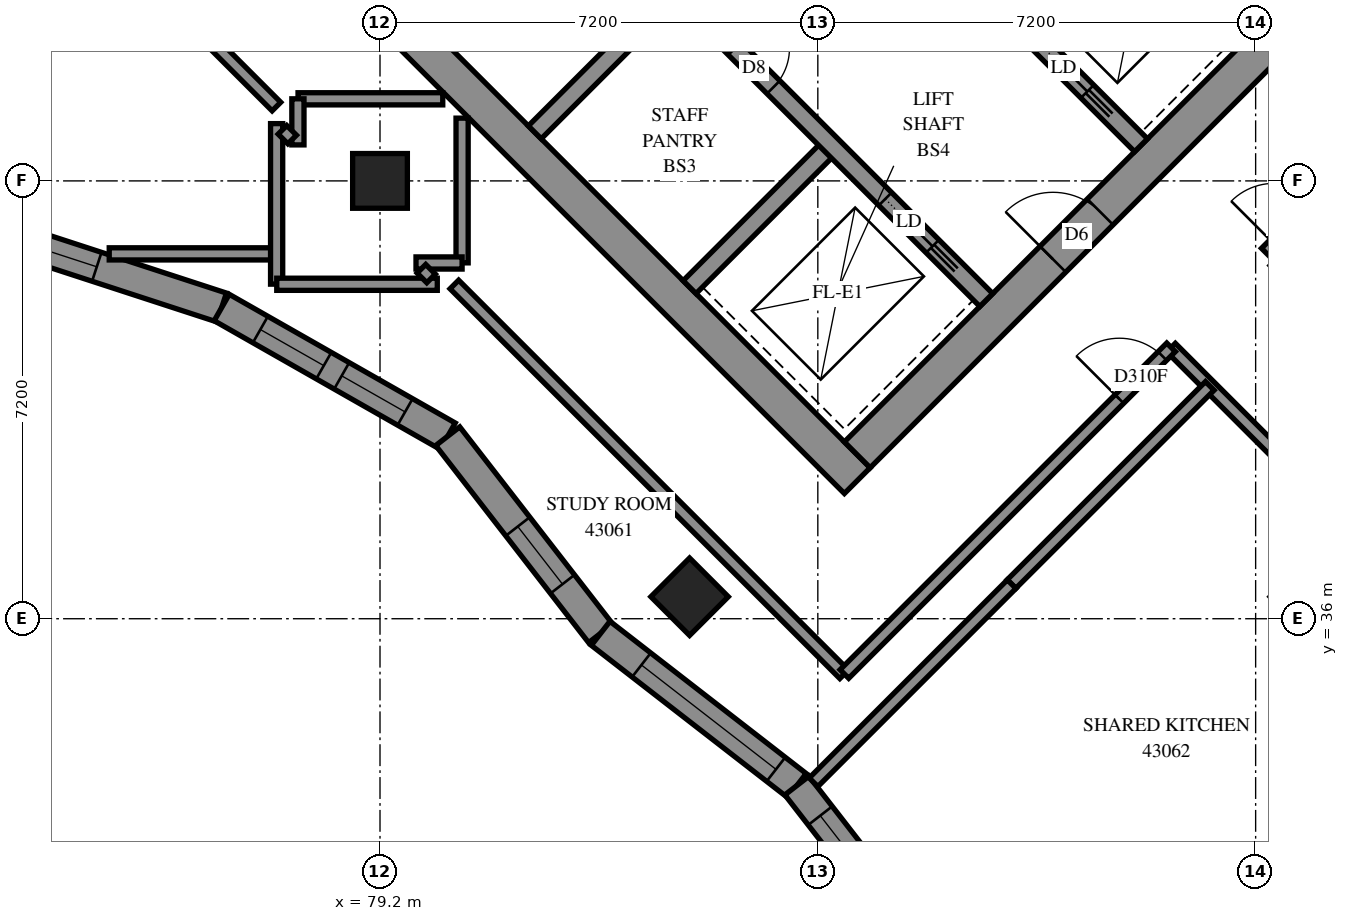
"""IFC4 building model, lengths in metres.
Left out: names, types, materials, properties, quantities, classifications, styles, units other than length and angle.
Written with IfcOpenShell. Run it as: python <this file> out.ifc"""

import sys

from ifc_helpers import new_model, si_unit, direction, frame, frame_2d, origin, origin_2d, place, context, subcontext, project, spatial, polyline, rectangle, outline, extrude, element, fill, save


model = new_model("IFC4")
c1 = context("Model", 3, precision=1e-05, world=origin(), true_north=direction((0.0, 1.0)))
c2 = subcontext(c1, "Body", "Model", "MODEL_VIEW")
j1 = project(units=[si_unit("LENGTHUNIT", "METRE"), si_unit("PLANEANGLEUNIT", "RADIAN")], contexts=[c1])
p1 = place(None, origin())
s1 = spatial("IfcSite", under=j1, at=p1, CompositionType="ELEMENT")
p2 = place(p1, origin())
s2 = spatial("IfcBuilding", under=s1, at=p2, CompositionType="ELEMENT")
p3 = place(p2, frame((0.0, 0.0, 159.2)))
s3 = spatial("IfcBuildingStorey", under=s2, at=p3, CompositionType="ELEMENT", Elevation=159.2)
for number, where, z_axis, x_axis in (
    (1, (79.2, 43.2, 0.0), (0.0, 0.0, 1.0), (1.0, 0.0, 0.0)),
    (2, (84.291, 36.362, 0.0), (0.0, 0.0, 1.0), (0.707, -0.707, 0.0)),
):
    element("IfcColumn", number, at=place(p3, frame(where, z_axis=z_axis, x_axis=x_axis)), inside=s3, PredefinedType="COLUMN", context=c2, shape_type="SweptSolid", body=[
        extrude(rectangle(XDim=0.9, YDim=0.9, at=origin_2d()), origin(), (0.0, 0.0, 1.0), 3.1),
    ])
p4 = place(p3, frame((76.018, 49.302, -0.3), z_axis=(0.0, 0.0, 1.0), x_axis=(0.7071067812, -0.7071067812, 0.0)))
e3 = element("IfcWall", 3, at=p4, inside=s3, PredefinedType="SHEAR", context=c2, shape_type="SweptSolid", body=[
    extrude(rectangle(XDim=15.6, YDim=0.6, at=frame_2d((7.8, 0.0))), origin(), (0.0, 0.0, 1.0), 2.7),
])
p5 = place(p3, frame((87.049, 38.695, -0.3), z_axis=(0.0, 0.0, 1.0), x_axis=(0.7071067812, 0.7071067812, 0.0)))
e4 = element("IfcWall", 4, at=p5, inside=s3, PredefinedType="SHEAR", context=c2, shape_type="SweptSolid", body=[
    extrude(rectangle(XDim=14.4, YDim=0.6, at=frame_2d((7.2, 0.0))), origin(), (0.0, 0.0, 1.0), 2.7),
])
p6 = place(p5, frame((4.55, 0.0, 0.3)))
e5 = element("IfcOpeningElement", 5, at=p6, cuts=e4, PredefinedType="OPENING", context=c2, shape_type="SweptSolid", body=[
    extrude(rectangle(XDim=1.1, YDim=2.1, at=frame_2d((0.55, 1.05))), frame((0.0, 0.31, 0.0), z_axis=(0.0, -1.0, 0.0), x_axis=(1.0, 0.0, 0.0)), (0.0, 0.0, 1.0), 0.62),
])
p7 = place(p5, frame((11.35, 0.0, 0.3)))
e6 = element("IfcOpeningElement", 6, at=p7, cuts=e4, PredefinedType="OPENING", context=c2, shape_type="SweptSolid", body=[
    extrude(rectangle(XDim=1.1, YDim=2.1, at=frame_2d((0.55, 1.05))), frame((0.0, 0.31, 0.0), z_axis=(0.0, -1.0, 0.0), x_axis=(1.0, 0.0, 0.0)), (0.0, 0.0, 1.0), 0.62),
])
for number, where, z_axis, x_axis in (
    (7, (81.746, 43.999, 0.0), (0.0, 0.0, 1.0), (0.707, 0.707, 0.0)),
    (8, (84.291, 41.453, 0.0), (0.0, 0.0, 1.0), (0.707, 0.707, 0.0)),
):
    element("IfcWall", number, at=place(p3, frame(where, z_axis=z_axis, x_axis=x_axis)), inside=s3, PredefinedType="SOLIDWALL", context=c2, shape_type="SweptSolid", body=[
        extrude(rectangle(XDim=3.3, YDim=0.3, at=frame_2d((1.65, 0.0))), origin(), (0.0, 0.0, 1.0), 3.1),
    ])
p8 = place(p3, frame((78.988, 51.423, 0.0), z_axis=(0.0, 0.0, 1.0), x_axis=(0.7071067812, -0.7071067812, 0.0)))
e9 = element("IfcWall", 9, at=p8, inside=s3, PredefinedType="SOLIDWALL", context=c2, shape_type="SweptSolid", body=[
    extrude(rectangle(XDim=14.4, YDim=0.3, at=frame_2d((7.2, 0.0))), origin(), (0.0, 0.0, 1.0), 3.1),
])
p9 = place(p8, frame((1.35, 0.0, 0.0)))
e10 = element("IfcOpeningElement", 10, at=p9, cuts=e9, PredefinedType="OPENING", context=c2, shape_type="SweptSolid", body=[
    extrude(rectangle(XDim=0.9, YDim=2.1, at=frame_2d((0.45, 1.05))), frame((0.0, 0.16, 0.0), z_axis=(0.0, -1.0, 0.0), x_axis=(1.0, 0.0, 0.0)), (0.0, 0.0, 1.0), 0.32),
])
p10 = place(p8, frame((4.95, 0.0, 0.0)))
e11 = element("IfcOpeningElement", 11, at=p10, cuts=e9, PredefinedType="OPENING", context=c2, shape_type="SweptSolid", body=[
    extrude(rectangle(XDim=0.9, YDim=2.1, at=frame_2d((0.45, 1.05))), frame((0.0, 0.16, 0.0), z_axis=(0.0, -1.0, 0.0), x_axis=(1.0, 0.0, 0.0)), (0.0, 0.0, 1.0), 0.32),
])
p11 = place(p8, frame((8.55, 0.0, 0.0)))
e12 = element("IfcOpeningElement", 12, at=p11, cuts=e9, PredefinedType="OPENING", context=c2, shape_type="SweptSolid", body=[
    extrude(rectangle(XDim=0.9, YDim=2.1, at=frame_2d((0.45, 1.05))), frame((0.0, 0.16, 0.0), z_axis=(0.0, -1.0, 0.0), x_axis=(1.0, 0.0, 0.0)), (0.0, 0.0, 1.0), 0.32),
])
p12 = place(p8, frame((12.05, 0.0, 0.0)))
e13 = element("IfcOpeningElement", 13, at=p12, cuts=e9, PredefinedType="OPENING", context=c2, shape_type="SweptSolid", body=[
    extrude(rectangle(XDim=1.1, YDim=2.1, at=frame_2d((0.55, 1.05))), frame((0.0, 0.16, 0.0), z_axis=(0.0, -1.0, 0.0), x_axis=(1.0, 0.0, 0.0)), (0.0, 0.0, 1.0), 0.32),
])
p13 = place(p3, frame((81.534, 53.969, 0.0), z_axis=(0.0, 0.0, 1.0), x_axis=(0.707103309, -0.7071102534, 0.0)))
e14 = element("IfcWall", 14, at=p13, inside=s3, PredefinedType="SOLIDWALL", context=c2, shape_type="SweptSolid", body=[
    extrude(rectangle(XDim=14.4, YDim=0.3, at=frame_2d((7.2, 0.0))), origin(), (0.0, 0.0, 1.0), 3.1),
])
p14 = place(p13, frame((1.25, 0.0, 0.0)))
e15 = element("IfcOpeningElement", 15, at=p14, cuts=e14, PredefinedType="OPENING", context=c2, shape_type="SweptSolid", body=[
    extrude(rectangle(XDim=1.1, YDim=2.1, at=frame_2d((0.55, 1.05))), frame((0.0, 0.16, 0.0), z_axis=(0.0, -1.0, 0.0), x_axis=(1.0, 0.0, 0.0)), (0.0, 0.0, 1.0), 0.32),
])
p15 = place(p13, frame((4.85, 0.0, 0.0)))
e16 = element("IfcOpeningElement", 16, at=p15, cuts=e14, PredefinedType="OPENING", context=c2, shape_type="SweptSolid", body=[
    extrude(rectangle(XDim=1.1, YDim=2.1, at=frame_2d((0.55, 1.05))), frame((0.0, 0.16, 0.0), z_axis=(0.0, -1.0, 0.0), x_axis=(1.0, 0.0, 0.0)), (0.0, 0.0, 1.0), 0.32),
])
p16 = place(p13, frame((8.45, 0.0, 0.0)))
e17 = element("IfcOpeningElement", 17, at=p16, cuts=e14, PredefinedType="OPENING", context=c2, shape_type="SweptSolid", body=[
    extrude(rectangle(XDim=1.1, YDim=2.1, at=frame_2d((0.55, 1.05))), frame((0.0, 0.16, 0.0), z_axis=(0.0, -1.0, 0.0), x_axis=(1.0, 0.0, 0.0)), (0.0, 0.0, 1.0), 0.32),
])
p17 = place(p13, frame((12.05, 0.0, 0.0)))
e18 = element("IfcOpeningElement", 18, at=p17, cuts=e14, PredefinedType="OPENING", context=c2, shape_type="SweptSolid", body=[
    extrude(rectangle(XDim=1.1, YDim=2.1, at=frame_2d((0.55, 1.05))), frame((0.0, 0.16, 0.0), z_axis=(0.0, -1.0, 0.0), x_axis=(1.0, 0.0, 0.0)), (0.0, 0.0, 1.0), 0.32),
])
p18 = place(p3, frame((73.105, 42.256, 0.0), z_axis=(0.0, 0.0, 1.0), x_axis=(0.9507748373, -0.3098825725, 0.0)))
e19 = element("IfcWall", 19, at=p18, inside=s3, PredefinedType="SOLIDWALL", context=c2, shape_type="SweptSolid", body=[
    extrude(outline(polyline([(0.059, -0.25), (3.648, -0.25), (3.698, 0.25), (-0.059, 0.25), (0.059, -0.25)])), origin(), (0.0, 0.0, 1.0), 3.1),
])
p19 = place(p18, frame((0.312, 0.0, 0.45)))
e20 = element("IfcOpeningElement", 20, at=p19, cuts=e19, PredefinedType="OPENING", context=c2, shape_type="SweptSolid", body=[
    extrude(rectangle(XDim=1.2, YDim=2.5, at=frame_2d((0.6, 1.25))), frame((0.0, 0.26, 0.0), z_axis=(0.0, -1.0, 0.0), x_axis=(1.0, 0.0, 0.0)), (0.0, 0.0, 1.0), 0.52),
])
p20 = place(p3, frame((76.597, 41.118, 0.0), z_axis=(0.0, 0.0, 1.0), x_axis=(0.8690276155, -0.4947635835, 0.0)))
e21 = element("IfcWall", 21, at=p20, inside=s3, PredefinedType="SOLIDWALL", context=c2, shape_type="SweptSolid", body=[
    extrude(outline(polyline([(0.025, -0.25), (4.227, -0.25), (4.327, 0.25), (-0.025, 0.25), (0.025, -0.25)])), origin(), (0.0, 0.0, 1.0), 3.1),
])
p21 = place(p20, frame((0.732, 0.0, 0.45)))
e22 = element("IfcOpeningElement", 22, at=p21, cuts=e21, PredefinedType="OPENING", context=c2, shape_type="SweptSolid", body=[
    extrude(rectangle(XDim=1.2, YDim=2.5, at=frame_2d((0.6, 1.25))), frame((0.0, 0.26, 0.0), z_axis=(0.0, -1.0, 0.0), x_axis=(1.0, 0.0, 0.0)), (0.0, 0.0, 1.0), 0.52),
])
p22 = place(p20, frame((2.27, 0.0, 0.45)))
e23 = element("IfcOpeningElement", 23, at=p22, cuts=e21, PredefinedType="OPENING", context=c2, shape_type="SweptSolid", body=[
    extrude(rectangle(XDim=1.2, YDim=2.5, at=frame_2d((0.6, 1.25))), frame((0.0, 0.26, 0.0), z_axis=(0.0, -1.0, 0.0), x_axis=(1.0, 0.0, 0.0)), (0.0, 0.0, 1.0), 0.52),
])
p23 = place(p3, frame((80.314, 39.002, 0.0), z_axis=(0.0, 0.0, 1.0), x_axis=(0.6128921644, -0.7901665614, 0.0)))
e24 = element("IfcWall", 24, at=p23, inside=s3, PredefinedType="SOLIDWALL", context=c2, shape_type="SweptSolid", body=[
    extrude(outline(polyline([(0.05, -0.25), (4.134, -0.25), (4.071, 0.25), (-0.05, 0.25), (0.05, -0.25)])), origin(), (0.0, 0.0, 1.0), 3.1),
])
p24 = place(p23, frame((1.879, 0.0, 0.45)))
e25 = element("IfcOpeningElement", 25, at=p24, cuts=e24, PredefinedType="OPENING", context=c2, shape_type="SweptSolid", body=[
    extrude(rectangle(XDim=1.2, YDim=2.5, at=frame_2d((0.6, 1.25))), frame((0.0, 0.26, 0.0), z_axis=(0.0, -1.0, 0.0), x_axis=(1.0, 0.0, 0.0)), (0.0, 0.0, 1.0), 0.52),
])
p25 = place(p3, frame((82.828, 35.76, 0.0), z_axis=(0.0, 0.0, 1.0), x_axis=(0.7901609986, -0.6128993362, 0.0)))
e26 = element("IfcWall", 26, at=p25, inside=s3, PredefinedType="SOLIDWALL", context=c2, shape_type="SweptSolid", body=[
    extrude(outline(polyline([(-0.032, -0.25), (4.053, -0.25), (4.116, 0.25), (0.032, 0.25), (-0.032, -0.25)])), origin(), (0.0, 0.0, 1.0), 3.1),
])
p26 = place(p25, frame((0.849, 0.0, 0.45)))
e27 = element("IfcOpeningElement", 27, at=p26, cuts=e26, PredefinedType="OPENING", context=c2, shape_type="SweptSolid", body=[
    extrude(rectangle(XDim=2.8, YDim=2.5, at=frame_2d((1.4, 1.25))), frame((0.0, 0.26, 0.0), z_axis=(0.0, -1.0, 0.0), x_axis=(1.0, 0.0, 0.0)), (0.0, 0.0, 1.0), 0.52),
])
p27 = place(p3, frame((86.056, 33.257, 0.0), z_axis=(0.0, 0.0, 1.0), x_axis=(0.6128993362, -0.7901609986, 0.0)))
e28 = element("IfcWall", 28, at=p27, inside=s3, PredefinedType="SOLIDWALL", context=c2, shape_type="SweptSolid", body=[
    extrude(outline(polyline([(0.032, -0.25), (4.116, -0.25), (4.053, 0.25), (-0.032, 0.25), (0.032, -0.25)])), origin(), (0.0, 0.0, 1.0), 3.1),
])
p28 = place(p27, frame((0.626, 0.0, 0.45)))
e29 = element("IfcOpeningElement", 29, at=p28, cuts=e28, PredefinedType="OPENING", context=c2, shape_type="SweptSolid", body=[
    extrude(rectangle(XDim=2.8, YDim=2.5, at=frame_2d((1.4, 1.25))), frame((0.0, 0.26, 0.0), z_axis=(0.0, -1.0, 0.0), x_axis=(1.0, 0.0, 0.0)), (0.0, 0.0, 1.0), 0.52),
])
p29 = place(p3, frame((92.209, 40.459, 0.0), z_axis=(0.0, 0.0, 1.0), x_axis=(0.7071067812, -0.7071067812, 0.0)))
e30 = element("IfcWall", 30, at=p29, inside=s3, PredefinedType="PARTITIONING", context=c2, shape_type="SweptSolid", body=[
    extrude(rectangle(XDim=11.698, YDim=0.2, at=frame_2d((5.849, 0.0))), origin(), (0.0, 0.0, 1.0), 3.1),
])
p30 = place(p29, frame((2.931, 0.0, 0.0)))
e31 = element("IfcOpeningElement", 31, at=p30, cuts=e30, PredefinedType="OPENING", context=c2, shape_type="SweptSolid", body=[
    extrude(rectangle(XDim=1.0, YDim=2.1, at=frame_2d((0.5, 1.05))), frame((0.0, 0.11, 0.0), z_axis=(0.0, -1.0, 0.0), x_axis=(1.0, 0.0, 0.0)), (0.0, 0.0, 1.0), 0.22),
])
p31 = place(p29, frame((10.223, 0.0, 0.0)))
e32 = element("IfcOpeningElement", 32, at=p31, cuts=e30, PredefinedType="OPENING", context=c2, shape_type="SweptSolid", body=[
    extrude(rectangle(XDim=0.9, YDim=2.1, at=frame_2d((0.45, 1.05))), frame((0.0, 0.11, 0.0), z_axis=(0.0, -1.0, 0.0), x_axis=(1.0, 0.0, 0.0)), (0.0, 0.0, 1.0), 0.22),
])
p32 = place(p3, frame((93.767, 42.021, 0.0), z_axis=(0.0, 0.0, 1.0), x_axis=(0.7071067812, 0.7071067812, 0.0)))
e33 = element("IfcWall", 33, at=p32, inside=s3, PredefinedType="PARTITIONING", context=c2, shape_type="SweptSolid", body=[
    extrude(rectangle(XDim=9.998, YDim=0.2, at=frame_2d((4.999, 0.0))), origin(), (0.0, 0.0, 1.0), 3.1),
])
p33 = place(p32, frame((0.196, 0.0, 0.0)))
e34 = element("IfcOpeningElement", 34, at=p33, cuts=e33, PredefinedType="OPENING", context=c2, shape_type="SweptSolid", body=[
    extrude(rectangle(XDim=1.0, YDim=2.1, at=frame_2d((0.5, 1.05))), frame((0.0, 0.11, 0.0), z_axis=(0.0, -1.0, 0.0), x_axis=(1.0, 0.0, 0.0)), (0.0, 0.0, 1.0), 0.22),
])
p34 = place(p3, frame((80.423, 41.497, 0.0), z_axis=(0.0, 0.0, 1.0), x_axis=(0.7071067812, -0.7071067812, 0.0)))
e35 = element("IfcWall", 35, at=p34, inside=s3, PredefinedType="PARTITIONING", context=c2, shape_type="SweptSolid", body=[
    extrude(rectangle(XDim=9.065, YDim=0.2, at=frame_2d((4.532, 0.0))), origin(), (0.0, 0.0, 1.0), 3.1),
])
p35 = place(p3, frame((86.837, 35.091, 0.0), z_axis=(0.0, 0.0, 1.0), x_axis=(0.7071067812, 0.7071067812, 0.0)))
e36 = element("IfcWall", 36, at=p35, inside=s3, PredefinedType="PARTITIONING", context=c2, shape_type="SweptSolid", body=[
    extrude(rectangle(XDim=7.597, YDim=0.2, at=frame_2d((3.799, 0.0))), origin(), (0.0, 0.0, 1.0), 3.1),
])
p36 = place(p35, frame((6.395, 0.0, 0.0)))
e37 = element("IfcOpeningElement", 37, at=p36, cuts=e36, PredefinedType="OPENING", context=c2, shape_type="SweptSolid", body=[
    extrude(rectangle(XDim=1.0, YDim=2.1, at=frame_2d((0.5, 1.05))), frame((0.0, 0.11, 0.0), z_axis=(0.0, -1.0, 0.0), x_axis=(1.0, 0.0, 0.0)), (0.0, 0.0, 1.0), 0.22),
])
p37 = place(p3, frame((91.366, 28.168, 0.0), z_axis=(0.0, 0.0, 1.0), x_axis=(0.7072591319, 0.7069543977, 0.0)))
e38 = element("IfcWall", 38, at=p37, inside=s3, PredefinedType="PARTITIONING", context=c2, shape_type="SweptSolid", body=[
    extrude(rectangle(XDim=6.891, YDim=0.2, at=frame_2d((3.446, 0.0))), origin(), (0.0, 0.0, 1.0), 3.1),
])
p38 = place(p3, frame((74.223, 47.697, 0.0), z_axis=(0.0, 0.0, 1.0), x_axis=(0.7071067812, -0.7071067812, 0.0)))
e39 = element("IfcWall", 39, at=p38, inside=s3, PredefinedType="PARTITIONING", context=c2, shape_type="SweptSolid", body=[
    extrude(rectangle(XDim=4.63, YDim=0.2, at=frame_2d((2.315, 0.0))), origin(), (0.0, 0.0, 1.0), 3.1),
])
p39 = place(p38, frame((0.401, 0.0, 0.0)))
e40 = element("IfcOpeningElement", 40, at=p39, cuts=e39, PredefinedType="OPENING", context=c2, shape_type="SweptSolid", body=[
    extrude(rectangle(XDim=1.0, YDim=2.1, at=frame_2d((0.5, 1.05))), frame((0.0, 0.11, 0.0), z_axis=(0.0, -1.0, 0.0), x_axis=(1.0, 0.0, 0.0)), (0.0, 0.0, 1.0), 0.22),
])
p40 = place(p3, frame((89.586, 36.57, 0.0), z_axis=(0.0, 0.0, 1.0), x_axis=(0.7073237184, 0.7068897774, 0.0)))
e41 = element("IfcWall", 41, at=p40, inside=s3, PredefinedType="PARTITIONING", context=c2, shape_type="SweptSolid", body=[
    extrude(rectangle(XDim=4.609, YDim=0.2, at=frame_2d((2.304, 0.0))), origin(), (0.0, 0.0, 1.0), 3.1),
])
p41 = place(p3, frame((86.33, 33.311, 0.0), z_axis=(0.0, 0.0, 1.0), x_axis=(0.7070959278, 0.7071176345, 0.0)))
e42 = element("IfcWall", 42, at=p41, inside=s3, PredefinedType="PARTITIONING", context=c2, shape_type="SweptSolid", body=[
    extrude(rectangle(XDim=4.607, YDim=0.2, at=frame_2d((2.304, 0.0))), origin(), (0.0, 0.0, 1.0), 3.1),
])
p42 = place(p3, frame((74.747, 42.0, 0.0), z_axis=(0.0, 0.0, 1.0), x_axis=(1.0, 0.0, 0.0)))
e43 = element("IfcWall", 43, at=p42, inside=s3, PredefinedType="PARTITIONING", context=c2, shape_type="SweptSolid", body=[
    extrude(rectangle(XDim=2.753, YDim=0.2, at=frame_2d((1.377, 0.0))), origin(), (0.0, 0.0, 1.0), 3.1),
])
for number, where, z_axis, x_axis in (
    (44, (77.5, 41.502, 0.0), (0.0, 0.0, 1.0), (0.0, 1.0, 0.0)),
    (45, (77.502, 41.5, 0.0), (0.0, 0.0, 1.0), (1.0, 0.0, 0.0)),
):
    element("IfcWall", number, at=place(p3, frame(where, z_axis=z_axis, x_axis=x_axis)), inside=s3, PredefinedType="PARTITIONING", context=c2, shape_type="SweptSolid", body=[
        extrude(rectangle(XDim=2.64, YDim=0.2, at=frame_2d((1.32, 0.0))), origin(), (0.0, 0.0, 1.0), 3.1),
    ])
for number, where, z_axis, x_axis in (
    (46, (80.55, 41.852, 0.0), (0.0, 0.0, 1.0), (0.0, 1.0, 0.0)),
    (47, (77.852, 44.55, 0.0), (0.0, 0.0, 1.0), (1.0, 0.0, 0.0)),
):
    element("IfcWall", number, at=place(p3, frame(where, z_axis=z_axis, x_axis=x_axis)), inside=s3, PredefinedType="PARTITIONING", context=c2, shape_type="SweptSolid", body=[
        extrude(rectangle(XDim=2.38, YDim=0.2, at=frame_2d((1.19, 0.0))), origin(), (0.0, 0.0, 1.0), 3.1),
    ])
for number, where, z_axis, x_axis in (
    (48, (77.85, 43.792, 0.0), (0.0, 0.0, 1.0), (0.0, 1.0, 0.0)),
    (49, (79.792, 41.85, 0.0), (0.0, 0.0, 1.0), (1.0, 0.0, 0.0)),
):
    element("IfcWall", number, at=place(p3, frame(where, z_axis=z_axis, x_axis=x_axis)), inside=s3, PredefinedType="PARTITIONING", context=c2, shape_type="SweptSolid", body=[
        extrude(rectangle(XDim=0.758, YDim=0.2, at=frame_2d((0.379, 0.0))), origin(), (0.0, 0.0, 1.0), 3.1),
    ])
for number, where, z_axis, x_axis in (
    (50, (79.881, 41.755, 0.0), (0.0, 0.0, 1.0), (0.707, -0.707, 0.0)),
    (51, (77.596, 44.04, 0.0), (0.0, 0.0, 1.0), (0.707, -0.707, 0.0)),
):
    element("IfcWall", number, at=place(p3, frame(where, z_axis=z_axis, x_axis=x_axis)), inside=s3, PredefinedType="PARTITIONING", context=c2, shape_type="SweptSolid", body=[
        extrude(rectangle(XDim=0.225, YDim=0.2, at=frame_2d((0.113, 0.0))), origin(), (0.0, 0.0, 1.0), 3.1),
    ])
p43 = place(p19, origin())
e52 = element("IfcWindow", 52, at=p43, inside=s3, PartitioningType="SINGLE_PANEL", PredefinedType="WINDOW", context=c2, shape_type="SweptSolid", body=[
    extrude(rectangle(XDim=1.2, YDim=2.5, at=frame_2d((0.6, 1.25))), frame((0.0, 0.18, 0.0), z_axis=(0.0, -1.0, 0.0), x_axis=(1.0, 0.0, 0.0)), (0.0, 0.0, 1.0), 0.06),
])
fill(e20, e52)
p44 = place(p21, origin())
e53 = element("IfcWindow", 53, at=p44, inside=s3, PartitioningType="SINGLE_PANEL", PredefinedType="WINDOW", context=c2, shape_type="SweptSolid", body=[
    extrude(rectangle(XDim=1.2, YDim=2.5, at=frame_2d((0.6, 1.25))), frame((0.0, 0.18, 0.0), z_axis=(0.0, -1.0, 0.0), x_axis=(1.0, 0.0, 0.0)), (0.0, 0.0, 1.0), 0.06),
])
fill(e22, e53)
p45 = place(p22, origin())
e54 = element("IfcWindow", 54, at=p45, inside=s3, PartitioningType="SINGLE_PANEL", PredefinedType="WINDOW", context=c2, shape_type="SweptSolid", body=[
    extrude(rectangle(XDim=1.2, YDim=2.5, at=frame_2d((0.6, 1.25))), frame((0.0, 0.18, 0.0), z_axis=(0.0, -1.0, 0.0), x_axis=(1.0, 0.0, 0.0)), (0.0, 0.0, 1.0), 0.06),
])
fill(e23, e54)
p46 = place(p24, origin())
e55 = element("IfcWindow", 55, at=p46, inside=s3, PartitioningType="SINGLE_PANEL", PredefinedType="WINDOW", context=c2, shape_type="SweptSolid", body=[
    extrude(rectangle(XDim=1.2, YDim=2.5, at=frame_2d((0.6, 1.25))), frame((0.0, 0.18, 0.0), z_axis=(0.0, -1.0, 0.0), x_axis=(1.0, 0.0, 0.0)), (0.0, 0.0, 1.0), 0.06),
])
fill(e25, e55)
p47 = place(p26, origin())
e56 = element("IfcWindow", 56, at=p47, inside=s3, PartitioningType="SINGLE_PANEL", PredefinedType="WINDOW", context=c2, shape_type="SweptSolid", body=[
    extrude(rectangle(XDim=2.8, YDim=2.5, at=frame_2d((1.4, 1.25))), frame((0.0, 0.18, 0.0), z_axis=(0.0, -1.0, 0.0), x_axis=(1.0, 0.0, 0.0)), (0.0, 0.0, 1.0), 0.06),
])
fill(e27, e56)
p48 = place(p28, origin())
e57 = element("IfcWindow", 57, at=p48, inside=s3, PartitioningType="SINGLE_PANEL", PredefinedType="WINDOW", context=c2, shape_type="SweptSolid", body=[
    extrude(rectangle(XDim=2.8, YDim=2.5, at=frame_2d((1.4, 1.25))), frame((0.0, 0.18, 0.0), z_axis=(0.0, -1.0, 0.0), x_axis=(1.0, 0.0, 0.0)), (0.0, 0.0, 1.0), 0.06),
])
fill(e29, e57)
p49 = place(p6, origin())
e58 = element("IfcDoor", 58, at=p49, inside=s3, OperationType="DOUBLE_DOOR_SINGLE_SWING", PredefinedType="DOOR", context=c2, shape_type="SweptSolid", body=[
    extrude(rectangle(XDim=1.1, YDim=2.1, at=frame_2d((0.55, 1.05))), frame((0.0, 0.025, 0.0), z_axis=(0.0, -1.0, 0.0), x_axis=(1.0, 0.0, 0.0)), (0.0, 0.0, 1.0), 0.05),
])
fill(e5, e58)
p50 = place(p11, origin())
e59 = element("IfcDoor", 59, at=p50, inside=s3, OperationType="SINGLE_SWING_LEFT", PredefinedType="DOOR", context=c2, shape_type="SweptSolid", body=[
    extrude(rectangle(XDim=0.9, YDim=2.1, at=frame_2d((0.45, 1.05))), frame((0.0, 0.025, 0.0), z_axis=(0.0, -1.0, 0.0), x_axis=(1.0, 0.0, 0.0)), (0.0, 0.0, 1.0), 0.05),
])
fill(e12, e59)
p51 = place(p12, origin())
e60 = element("IfcDoor", 60, at=p51, inside=s3, OperationType="SLIDING_TO_RIGHT", PredefinedType="DOOR", context=c2, shape_type="SweptSolid", body=[
    extrude(rectangle(XDim=1.1, YDim=2.1, at=frame_2d((0.55, 1.05))), frame((0.0, 0.025, 0.0), z_axis=(0.0, -1.0, 0.0), x_axis=(1.0, 0.0, 0.0)), (0.0, 0.0, 1.0), 0.05),
])
fill(e13, e60)
p52 = place(p17, origin())
e61 = element("IfcDoor", 61, at=p52, inside=s3, OperationType="SLIDING_TO_RIGHT", PredefinedType="DOOR", context=c2, shape_type="SweptSolid", body=[
    extrude(rectangle(XDim=1.1, YDim=2.1, at=frame_2d((0.55, 1.05))), frame((0.0, 0.025, 0.0), z_axis=(0.0, -1.0, 0.0), x_axis=(1.0, 0.0, 0.0)), (0.0, 0.0, 1.0), 0.05),
])
fill(e18, e61)
p53 = place(p36, origin())
e62 = element("IfcDoor", 62, at=p53, inside=s3, OperationType="SINGLE_SWING_LEFT", PredefinedType="DOOR", context=c2, shape_type="SweptSolid", body=[
    extrude(rectangle(XDim=1.0, YDim=2.1, at=frame_2d((0.5, 1.05))), frame((0.0, 0.025, 0.0), z_axis=(0.0, -1.0, 0.0), x_axis=(1.0, 0.0, 0.0)), (0.0, 0.0, 1.0), 0.05),
])
fill(e37, e62)
save(model, sys.argv[1])
